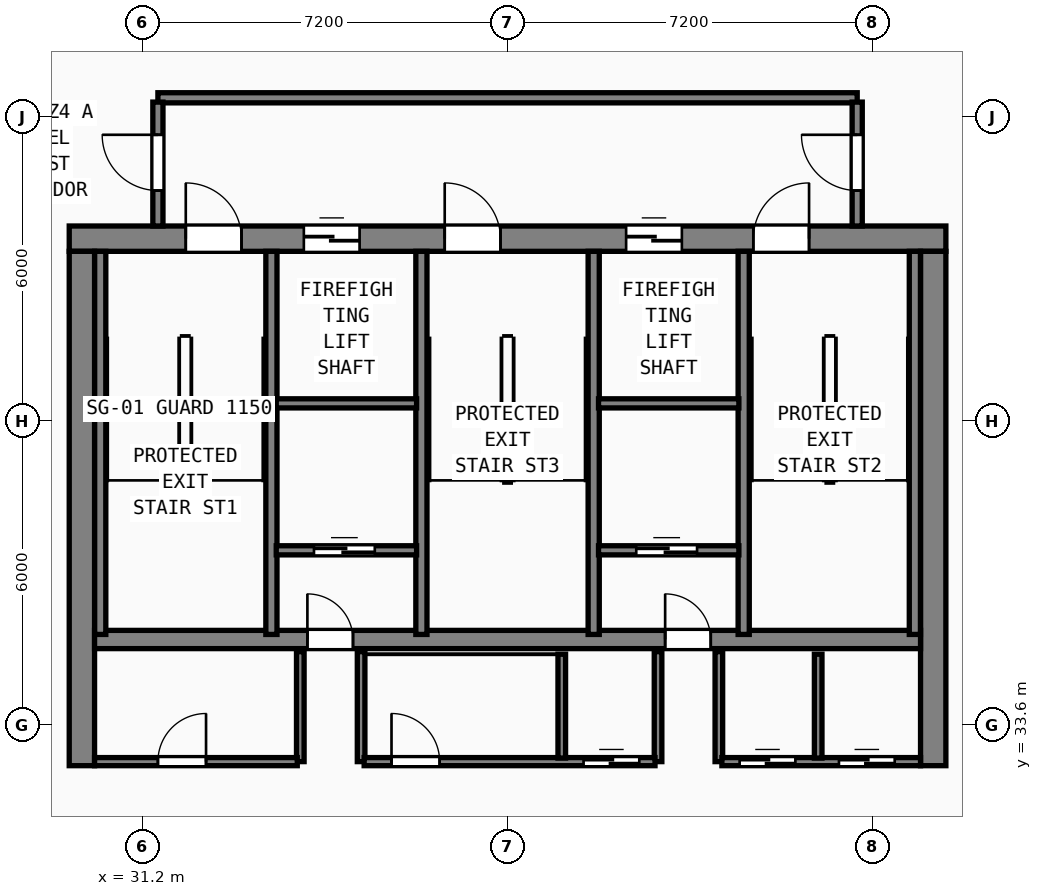
"""IFC4 building model, lengths in metres.
Left out: names, types, materials, properties, quantities, classifications, styles, units other than length and angle.
Written with IfcOpenShell. Run it as: python <this file> out.ifc"""

import sys

from ifc_helpers import new_model, si_unit, direction, frame, frame_2d, origin, place, context, subcontext, project, spatial, rectangle, extrude, element, fill, save


model = new_model("IFC4")
c1 = context("Model", 3, precision=1e-05, world=origin(), true_north=direction((0.0, 1.0)))
c2 = subcontext(c1, "Body", "Model", "MODEL_VIEW")
j1 = project(units=[si_unit("LENGTHUNIT", "METRE"), si_unit("PLANEANGLEUNIT", "RADIAN")], contexts=[c1])
p1 = place(None, origin())
s1 = spatial("IfcSite", under=j1, at=p1, CompositionType="ELEMENT")
p2 = place(p1, origin())
s2 = spatial("IfcBuilding", under=s1, at=p2, CompositionType="ELEMENT")
p3 = place(p2, frame((0.0, 0.0, 235.2)))
s3 = spatial("IfcBuildingStorey", under=s2, at=p3, CompositionType="ELEMENT", Elevation=235.2)
p4 = place(p3, frame((29.75, 43.2, 0.0), z_axis=(0.0, 0.0, 1.0), x_axis=(1.0, 0.0, 0.0)))
e1 = element("IfcWall", 1, at=p4, inside=s3, PredefinedType="SHEAR", context=c2, shape_type="SweptSolid", body=[
    extrude(rectangle(XDim=17.3, YDim=0.5, at=frame_2d((8.65, 0.0))), origin(), (0.0, 0.0, 1.0), 3.67),
])
p5 = place(p4, frame((2.3, 0.0, 0.0)))
e2 = element("IfcOpeningElement", 2, at=p5, cuts=e1, PredefinedType="OPENING", context=c2, shape_type="SweptSolid", body=[
    extrude(rectangle(XDim=1.1, YDim=2.15, at=frame_2d((0.55, 1.075))), frame((0.0, 0.26, 0.0), z_axis=(0.0, -1.0, 0.0), x_axis=(1.0, 0.0, 0.0)), (0.0, 0.0, 1.0), 0.52),
])
p6 = place(p4, frame((7.41, 0.0, 0.0)))
e3 = element("IfcOpeningElement", 3, at=p6, cuts=e1, PredefinedType="OPENING", context=c2, shape_type="SweptSolid", body=[
    extrude(rectangle(XDim=1.1, YDim=2.15, at=frame_2d((0.55, 1.075))), frame((0.0, 0.26, 0.0), z_axis=(0.0, -1.0, 0.0), x_axis=(1.0, 0.0, 0.0)), (0.0, 0.0, 1.0), 0.52),
])
p7 = place(p4, frame((13.5, 0.0, 0.0)))
e4 = element("IfcOpeningElement", 4, at=p7, cuts=e1, PredefinedType="OPENING", context=c2, shape_type="SweptSolid", body=[
    extrude(rectangle(XDim=1.1, YDim=2.15, at=frame_2d((0.55, 1.075))), frame((0.0, 0.26, 0.0), z_axis=(0.0, -1.0, 0.0), x_axis=(1.0, 0.0, 0.0)), (0.0, 0.0, 1.0), 0.52),
])
p8 = place(p4, frame((4.63, 0.0, 0.0)))
e5 = element("IfcOpeningElement", 5, at=p8, cuts=e1, PredefinedType="OPENING", context=c2, shape_type="SweptSolid", body=[
    extrude(rectangle(XDim=1.1, YDim=2.2, at=frame_2d((0.55, 1.1))), frame((0.0, 0.26, 0.0), z_axis=(0.0, -1.0, 0.0), x_axis=(1.0, 0.0, 0.0)), (0.0, 0.0, 1.0), 0.52),
])
p9 = place(p4, frame((10.99, 0.0, 0.0)))
e6 = element("IfcOpeningElement", 6, at=p9, cuts=e1, PredefinedType="OPENING", context=c2, shape_type="SweptSolid", body=[
    extrude(rectangle(XDim=1.1, YDim=2.2, at=frame_2d((0.55, 1.1))), frame((0.0, 0.26, 0.0), z_axis=(0.0, -1.0, 0.0), x_axis=(1.0, 0.0, 0.0)), (0.0, 0.0, 1.0), 0.52),
])
for number, where, z_axis, x_axis in (
    (7, (30.0, 32.8, 0.0), (0.0, 0.0, 1.0), (0.0, 1.0, 0.0)),
    (8, (46.8, 32.8, 0.0), (0.0, 0.0, 1.0), (0.0, 1.0, 0.0)),
):
    element("IfcWall", number, at=place(p3, frame(where, z_axis=z_axis, x_axis=x_axis)), inside=s3, PredefinedType="SHEAR", context=c2, shape_type="SweptSolid", body=[
        extrude(rectangle(XDim=10.15, YDim=0.5, at=frame_2d((5.075, 0.0))), origin(), (0.0, 0.0, 1.0), 3.67),
    ])
p10 = place(p3, frame((30.25, 35.29, 0.0), z_axis=(0.0, 0.0, 1.0), x_axis=(1.0, 0.0, 0.0)))
e9 = element("IfcWall", 9, at=p10, inside=s3, PredefinedType="SHEAR", context=c2, shape_type="SweptSolid", body=[
    extrude(rectangle(XDim=16.3, YDim=0.36, at=frame_2d((8.15, 0.0))), origin(), (0.0, 0.0, 1.0), 3.67),
])
p11 = place(p10, frame((5.1, 0.0, 0.0), z_axis=(0.0, 0.0, 1.0), x_axis=(-1.0, 0.0, 0.0)))
e10 = element("IfcOpeningElement", 10, at=p11, cuts=e9, PredefinedType="OPENING", context=c2, shape_type="SweptSolid", body=[
    extrude(rectangle(XDim=0.9, YDim=2.1, at=frame_2d((0.45, 1.05))), frame((0.0, 0.19, 0.0), z_axis=(0.0, -1.0, 0.0), x_axis=(1.0, 0.0, 0.0)), (0.0, 0.0, 1.0), 0.38),
])
p12 = place(p10, frame((12.16, 0.0, 0.0), z_axis=(0.0, 0.0, 1.0), x_axis=(-1.0, 0.0, 0.0)))
e11 = element("IfcOpeningElement", 11, at=p12, cuts=e9, PredefinedType="OPENING", context=c2, shape_type="SweptSolid", body=[
    extrude(rectangle(XDim=0.9, YDim=2.1, at=frame_2d((0.45, 1.05))), frame((0.0, 0.19, 0.0), z_axis=(0.0, -1.0, 0.0), x_axis=(1.0, 0.0, 0.0)), (0.0, 0.0, 1.0), 0.38),
])
for number, where, z_axis, x_axis in (
    (12, (30.362, 35.39, 0.0), (0.0, 0.0, 1.0), (0.0, 1.0, 0.0)),
    (13, (33.74, 35.39, 0.0), (0.0, 0.0, 1.0), (0.0, 1.0, 0.0)),
    (14, (36.7, 35.39, 0.0), (0.0, 0.0, 1.0), (0.0, 1.0, 0.0)),
    (15, (40.1, 35.39, 0.0), (0.0, 0.0, 1.0), (0.0, 1.0, 0.0)),
    (16, (43.06, 35.39, 0.0), (0.0, 0.0, 1.0), (0.0, 1.0, 0.0)),
    (17, (46.438, 35.39, 0.0), (0.0, 0.0, 1.0), (0.0, 1.0, 0.0)),
):
    element("IfcWall", number, at=place(p3, frame(where, z_axis=z_axis, x_axis=x_axis)), inside=s3, PredefinedType="SHEAR", context=c2, shape_type="SweptSolid", body=[
        extrude(rectangle(XDim=7.56, YDim=0.22, at=frame_2d((3.78, 0.0))), origin(), (0.0, 0.0, 1.0), 3.67),
    ])
p13 = place(p3, frame((31.5, 45.98, 0.0), z_axis=(0.0, 0.0, 1.0), x_axis=(1.0, 0.0, 0.0)))
e18 = element("IfcWall", 18, at=p13, inside=s3, PredefinedType="SOLIDWALL", context=c2, shape_type="SweptSolid", body=[
    extrude(rectangle(XDim=13.8, YDim=0.2, at=frame_2d((6.9, 0.0))), origin(), (0.0, 0.0, 1.0), 3.67),
])
p14 = place(p3, frame((31.5, 43.45, 0.0), z_axis=(0.0, 0.0, 1.0), x_axis=(0.0, 1.0, 0.0)))
e19 = element("IfcWall", 19, at=p14, inside=s3, PredefinedType="SOLIDWALL", context=c2, shape_type="SweptSolid", body=[
    extrude(rectangle(XDim=2.445, YDim=0.2, at=frame_2d((1.223, 0.0))), origin(), (0.0, 0.0, 1.0), 3.67),
])
p15 = place(p14, frame((1.8, 0.0, 0.0), z_axis=(0.0, 0.0, 1.0), x_axis=(-1.0, 0.0, 0.0)))
e20 = element("IfcOpeningElement", 20, at=p15, cuts=e19, PredefinedType="OPENING", context=c2, shape_type="SweptSolid", body=[
    extrude(rectangle(XDim=1.1, YDim=2.15, at=frame_2d((0.55, 1.075))), frame((0.0, 0.11, 0.0), z_axis=(0.0, -1.0, 0.0), x_axis=(1.0, 0.0, 0.0)), (0.0, 0.0, 1.0), 0.22),
])
p16 = place(p3, frame((45.3, 43.45, 0.0), z_axis=(0.0, 0.0, 1.0), x_axis=(0.0, 1.0, 0.0)))
e21 = element("IfcWall", 21, at=p16, inside=s3, PredefinedType="SOLIDWALL", context=c2, shape_type="SweptSolid", body=[
    extrude(rectangle(XDim=2.445, YDim=0.2, at=frame_2d((1.223, 0.0))), origin(), (0.0, 0.0, 1.0), 3.67),
])
p17 = place(p16, frame((0.7, 0.0, 0.0)))
e22 = element("IfcOpeningElement", 22, at=p17, cuts=e21, PredefinedType="OPENING", context=c2, shape_type="SweptSolid", body=[
    extrude(rectangle(XDim=1.1, YDim=2.15, at=frame_2d((0.55, 1.075))), frame((0.0, 0.11, 0.0), z_axis=(0.0, -1.0, 0.0), x_axis=(1.0, 0.0, 0.0)), (0.0, 0.0, 1.0), 0.22),
])
for number, where, z_axis, x_axis in (
    (23, (33.835, 39.95, 0.0), (0.0, 0.0, 1.0), (1.0, 0.0, 0.0)),
    (24, (40.195, 39.95, 0.0), (0.0, 0.0, 1.0), (1.0, 0.0, 0.0)),
):
    element("IfcWall", number, at=place(p3, frame(where, z_axis=z_axis, x_axis=x_axis)), inside=s3, PredefinedType="SOLIDWALL", context=c2, shape_type="SweptSolid", body=[
        extrude(rectangle(XDim=2.77, YDim=0.18, at=frame_2d((1.385, 0.0))), origin(), (0.0, 0.0, 1.0), 3.67),
    ])
p18 = place(p3, frame((33.835, 37.05, 0.0), z_axis=(0.0, 0.0, 1.0), x_axis=(1.0, 0.0, 0.0)))
e25 = element("IfcWall", 25, at=p18, inside=s3, PredefinedType="SOLIDWALL", context=c2, shape_type="SweptSolid", body=[
    extrude(rectangle(XDim=2.77, YDim=0.18, at=frame_2d((1.385, 0.0))), origin(), (0.0, 0.0, 1.0), 3.67),
])
p19 = place(p18, frame((1.945, 0.0, 0.0), z_axis=(0.0, 0.0, 1.0), x_axis=(-1.0, 0.0, 0.0)))
e26 = element("IfcOpeningElement", 26, at=p19, cuts=e25, PredefinedType="OPENING", context=c2, shape_type="SweptSolid", body=[
    extrude(rectangle(XDim=1.2, YDim=2.2, at=frame_2d((0.6, 1.1))), frame((0.0, 0.1, 0.0), z_axis=(0.0, -1.0, 0.0), x_axis=(1.0, 0.0, 0.0)), (0.0, 0.0, 1.0), 0.2),
])
for number, where, z_axis, x_axis in (
    (27, (34.31, 32.88, 0.0), (0.0, 0.0, 1.0), (0.0, 1.0, 0.0)),
    (28, (35.51, 32.88, 0.0), (0.0, 0.0, 1.0), (0.0, 1.0, 0.0)),
):
    element("IfcWall", number, at=place(p3, frame(where, z_axis=z_axis, x_axis=x_axis)), inside=s3, PredefinedType="SOLIDWALL", context=c2, shape_type="SweptSolid", body=[
        extrude(rectangle(XDim=2.17, YDim=0.15, at=frame_2d((1.085, 0.0))), origin(), (0.0, 0.0, 1.0), 3.67),
    ])
p20 = place(p3, frame((40.195, 37.05, 0.0), z_axis=(0.0, 0.0, 1.0), x_axis=(1.0, 0.0, 0.0)))
e29 = element("IfcWall", 29, at=p20, inside=s3, PredefinedType="SOLIDWALL", context=c2, shape_type="SweptSolid", body=[
    extrude(rectangle(XDim=2.77, YDim=0.18, at=frame_2d((1.385, 0.0))), origin(), (0.0, 0.0, 1.0), 3.67),
])
p21 = place(p20, frame((1.945, 0.0, 0.0), z_axis=(0.0, 0.0, 1.0), x_axis=(-1.0, 0.0, 0.0)))
e30 = element("IfcOpeningElement", 30, at=p21, cuts=e29, PredefinedType="OPENING", context=c2, shape_type="SweptSolid", body=[
    extrude(rectangle(XDim=1.2, YDim=2.2, at=frame_2d((0.6, 1.1))), frame((0.0, 0.1, 0.0), z_axis=(0.0, -1.0, 0.0), x_axis=(1.0, 0.0, 0.0)), (0.0, 0.0, 1.0), 0.2),
])
for number, where, z_axis, x_axis in (
    (31, (41.37, 32.88, 0.0), (0.0, 0.0, 1.0), (0.0, 1.0, 0.0)),
    (32, (42.57, 32.88, 0.0), (0.0, 0.0, 1.0), (0.0, 1.0, 0.0)),
):
    element("IfcWall", number, at=place(p3, frame(where, z_axis=z_axis, x_axis=x_axis)), inside=s3, PredefinedType="SOLIDWALL", context=c2, shape_type="SweptSolid", body=[
        extrude(rectangle(XDim=2.17, YDim=0.15, at=frame_2d((1.085, 0.0))), origin(), (0.0, 0.0, 1.0), 3.67),
    ])
p22 = place(p3, frame((30.25, 32.88, 0.0), z_axis=(0.0, 0.0, 1.0), x_axis=(1.0, 0.0, 0.0)))
e33 = element("IfcWall", 33, at=p22, inside=s3, PredefinedType="SOLIDWALL", context=c2, shape_type="SweptSolid", body=[
    extrude(rectangle(XDim=4.0, YDim=0.16, at=frame_2d((2.0, 0.0))), origin(), (0.0, 0.0, 1.0), 3.67),
])
p23 = place(p22, frame((2.2, 0.0, 0.0), z_axis=(0.0, 0.0, 1.0), x_axis=(-1.0, 0.0, 0.0)))
e34 = element("IfcOpeningElement", 34, at=p23, cuts=e33, PredefinedType="OPENING", context=c2, shape_type="SweptSolid", body=[
    extrude(rectangle(XDim=0.95, YDim=2.12, at=frame_2d((0.475, 1.06))), frame((0.0, 0.09, 0.0), z_axis=(0.0, -1.0, 0.0), x_axis=(1.0, 0.0, 0.0)), (0.0, 0.0, 1.0), 0.18),
])
p24 = place(p3, frame((35.57, 32.88, 0.0), z_axis=(0.0, 0.0, 1.0), x_axis=(1.0, 0.0, 0.0)))
e35 = element("IfcWall", 35, at=p24, inside=s3, PredefinedType="SOLIDWALL", context=c2, shape_type="SweptSolid", body=[
    extrude(rectangle(XDim=5.74, YDim=0.16, at=frame_2d((2.87, 0.0))), origin(), (0.0, 0.0, 1.0), 3.67),
])
p25 = place(p24, frame((1.49, 0.0, 0.0), z_axis=(0.0, 0.0, 1.0), x_axis=(-1.0, 0.0, 0.0)))
e36 = element("IfcOpeningElement", 36, at=p25, cuts=e35, PredefinedType="OPENING", context=c2, shape_type="SweptSolid", body=[
    extrude(rectangle(XDim=0.95, YDim=2.12, at=frame_2d((0.475, 1.06))), frame((0.0, 0.09, 0.0), z_axis=(0.0, -1.0, 0.0), x_axis=(1.0, 0.0, 0.0)), (0.0, 0.0, 1.0), 0.18),
])
p26 = place(p24, frame((5.43, 0.0, 0.0), z_axis=(0.0, 0.0, 1.0), x_axis=(-1.0, 0.0, 0.0)))
e37 = element("IfcOpeningElement", 37, at=p26, cuts=e35, PredefinedType="OPENING", context=c2, shape_type="SweptSolid", body=[
    extrude(rectangle(XDim=1.1, YDim=2.2, at=frame_2d((0.55, 1.1))), frame((0.0, 0.09, 0.0), z_axis=(0.0, -1.0, 0.0), x_axis=(1.0, 0.0, 0.0)), (0.0, 0.0, 1.0), 0.18),
])
p27 = place(p3, frame((42.63, 32.88, 0.0), z_axis=(0.0, 0.0, 1.0), x_axis=(1.0, 0.0, 0.0)))
e38 = element("IfcWall", 38, at=p27, inside=s3, PredefinedType="SOLIDWALL", context=c2, shape_type="SweptSolid", body=[
    extrude(rectangle(XDim=3.92, YDim=0.16, at=frame_2d((1.96, 0.0))), origin(), (0.0, 0.0, 1.0), 3.67),
])
p28 = place(p27, frame((1.45, 0.0, 0.0), z_axis=(0.0, 0.0, 1.0), x_axis=(-1.0, 0.0, 0.0)))
e39 = element("IfcOpeningElement", 39, at=p28, cuts=e38, PredefinedType="OPENING", context=c2, shape_type="SweptSolid", body=[
    extrude(rectangle(XDim=1.1, YDim=2.2, at=frame_2d((0.55, 1.1))), frame((0.0, 0.09, 0.0), z_axis=(0.0, -1.0, 0.0), x_axis=(1.0, 0.0, 0.0)), (0.0, 0.0, 1.0), 0.18),
])
p29 = place(p27, frame((3.41, 0.0, 0.0), z_axis=(0.0, 0.0, 1.0), x_axis=(-1.0, 0.0, 0.0)))
e40 = element("IfcOpeningElement", 40, at=p29, cuts=e38, PredefinedType="OPENING", context=c2, shape_type="SweptSolid", body=[
    extrude(rectangle(XDim=1.1, YDim=2.2, at=frame_2d((0.55, 1.1))), frame((0.0, 0.09, 0.0), z_axis=(0.0, -1.0, 0.0), x_axis=(1.0, 0.0, 0.0)), (0.0, 0.0, 1.0), 0.18),
])
for number, where, z_axis, x_axis in (
    (41, (39.47, 32.95, 0.0), (0.0, 0.0, 1.0), (0.0, 1.0, 0.0)),
    (42, (44.53, 32.95, 0.0), (0.0, 0.0, 1.0), (0.0, 1.0, 0.0)),
):
    element("IfcWall", number, at=place(p3, frame(where, z_axis=z_axis, x_axis=x_axis)), inside=s3, PredefinedType="SOLIDWALL", context=c2, shape_type="SweptSolid", body=[
        extrude(rectangle(XDim=2.05, YDim=0.15, at=frame_2d((1.025, 0.0))), origin(), (0.0, 0.0, 1.0), 3.67),
    ])
p30 = place(p5, origin())
e43 = element("IfcDoor", 43, at=p30, inside=s3, OperationType="SINGLE_SWING_LEFT", PredefinedType="DOOR", context=c2, shape_type="SweptSolid", body=[
    extrude(rectangle(XDim=1.1, YDim=2.15, at=frame_2d((0.55, 1.075))), frame((0.0, 0.185, 0.0), z_axis=(0.0, -1.0, 0.0), x_axis=(1.0, 0.0, 0.0)), (0.0, 0.0, 1.0), 0.05),
])
fill(e2, e43)
p31 = place(p6, origin())
e44 = element("IfcDoor", 44, at=p31, inside=s3, OperationType="SINGLE_SWING_LEFT", PredefinedType="DOOR", context=c2, shape_type="SweptSolid", body=[
    extrude(rectangle(XDim=1.1, YDim=2.15, at=frame_2d((0.55, 1.075))), frame((0.0, 0.185, 0.0), z_axis=(0.0, -1.0, 0.0), x_axis=(1.0, 0.0, 0.0)), (0.0, 0.0, 1.0), 0.05),
])
fill(e3, e44)
p32 = place(p7, origin())
e45 = element("IfcDoor", 45, at=p32, inside=s3, OperationType="SINGLE_SWING_RIGHT", PredefinedType="DOOR", context=c2, shape_type="SweptSolid", body=[
    extrude(rectangle(XDim=1.1, YDim=2.15, at=frame_2d((0.55, 1.075))), frame((0.0, 0.185, 0.0), z_axis=(0.0, -1.0, 0.0), x_axis=(1.0, 0.0, 0.0)), (0.0, 0.0, 1.0), 0.05),
])
fill(e4, e45)
p33 = place(p15, origin())
e46 = element("IfcDoor", 46, at=p33, inside=s3, OperationType="SINGLE_SWING_LEFT", PredefinedType="DOOR", context=c2, shape_type="SweptSolid", body=[
    extrude(rectangle(XDim=1.1, YDim=2.15, at=frame_2d((0.55, 1.075))), frame((0.0, 0.025, 0.0), z_axis=(0.0, -1.0, 0.0), x_axis=(1.0, 0.0, 0.0)), (0.0, 0.0, 1.0), 0.05),
])
fill(e20, e46)
p34 = place(p17, origin())
e47 = element("IfcDoor", 47, at=p34, inside=s3, OperationType="SINGLE_SWING_RIGHT", PredefinedType="DOOR", context=c2, shape_type="SweptSolid", body=[
    extrude(rectangle(XDim=1.1, YDim=2.15, at=frame_2d((0.55, 1.075))), frame((0.0, 0.025, 0.0), z_axis=(0.0, -1.0, 0.0), x_axis=(1.0, 0.0, 0.0)), (0.0, 0.0, 1.0), 0.05),
])
fill(e22, e47)
p35 = place(p8, origin())
e48 = element("IfcDoor", 48, at=p35, inside=s3, OperationType="SLIDING_TO_LEFT", PredefinedType="DOOR", context=c2, shape_type="SweptSolid", body=[
    extrude(rectangle(XDim=1.1, YDim=2.2, at=frame_2d((0.55, 1.1))), frame((0.0, 0.185, 0.0), z_axis=(0.0, -1.0, 0.0), x_axis=(1.0, 0.0, 0.0)), (0.0, 0.0, 1.0), 0.05),
])
fill(e5, e48)
p36 = place(p9, origin())
e49 = element("IfcDoor", 49, at=p36, inside=s3, OperationType="SLIDING_TO_LEFT", PredefinedType="DOOR", context=c2, shape_type="SweptSolid", body=[
    extrude(rectangle(XDim=1.1, YDim=2.2, at=frame_2d((0.55, 1.1))), frame((0.0, 0.185, 0.0), z_axis=(0.0, -1.0, 0.0), x_axis=(1.0, 0.0, 0.0)), (0.0, 0.0, 1.0), 0.05),
])
fill(e6, e49)
p37 = place(p19, origin())
e50 = element("IfcDoor", 50, at=p37, inside=s3, OperationType="SLIDING_TO_RIGHT", PredefinedType="DOOR", context=c2, shape_type="SweptSolid", body=[
    extrude(rectangle(XDim=1.2, YDim=2.2, at=frame_2d((0.6, 1.1))), frame((0.0, 0.025, 0.0), z_axis=(0.0, -1.0, 0.0), x_axis=(1.0, 0.0, 0.0)), (0.0, 0.0, 1.0), 0.05),
])
fill(e26, e50)
p38 = place(p11, origin())
e51 = element("IfcDoor", 51, at=p38, inside=s3, OperationType="SINGLE_SWING_RIGHT", PredefinedType="DOOR", context=c2, shape_type="SweptSolid", body=[
    extrude(rectangle(XDim=0.9, YDim=2.1, at=frame_2d((0.45, 1.05))), frame((0.0, 0.025, 0.0), z_axis=(0.0, -1.0, 0.0), x_axis=(1.0, 0.0, 0.0)), (0.0, 0.0, 1.0), 0.05),
])
fill(e10, e51)
p39 = place(p21, origin())
e52 = element("IfcDoor", 52, at=p39, inside=s3, OperationType="SLIDING_TO_RIGHT", PredefinedType="DOOR", context=c2, shape_type="SweptSolid", body=[
    extrude(rectangle(XDim=1.2, YDim=2.2, at=frame_2d((0.6, 1.1))), frame((0.0, 0.025, 0.0), z_axis=(0.0, -1.0, 0.0), x_axis=(1.0, 0.0, 0.0)), (0.0, 0.0, 1.0), 0.05),
])
fill(e30, e52)
p40 = place(p12, origin())
e53 = element("IfcDoor", 53, at=p40, inside=s3, OperationType="SINGLE_SWING_RIGHT", PredefinedType="DOOR", context=c2, shape_type="SweptSolid", body=[
    extrude(rectangle(XDim=0.9, YDim=2.1, at=frame_2d((0.45, 1.05))), frame((0.0, 0.025, 0.0), z_axis=(0.0, -1.0, 0.0), x_axis=(1.0, 0.0, 0.0)), (0.0, 0.0, 1.0), 0.05),
])
fill(e11, e53)
p41 = place(p23, origin())
e54 = element("IfcDoor", 54, at=p41, inside=s3, OperationType="SINGLE_SWING_LEFT", PredefinedType="DOOR", context=c2, shape_type="SweptSolid", body=[
    extrude(rectangle(XDim=0.95, YDim=2.12, at=frame_2d((0.475, 1.06))), frame((0.0, 0.025, 0.0), z_axis=(0.0, -1.0, 0.0), x_axis=(1.0, 0.0, 0.0)), (0.0, 0.0, 1.0), 0.05),
])
fill(e34, e54)
p42 = place(p25, origin())
e55 = element("IfcDoor", 55, at=p42, inside=s3, OperationType="SINGLE_SWING_RIGHT", PredefinedType="DOOR", context=c2, shape_type="SweptSolid", body=[
    extrude(rectangle(XDim=0.95, YDim=2.12, at=frame_2d((0.475, 1.06))), frame((0.0, 0.025, 0.0), z_axis=(0.0, -1.0, 0.0), x_axis=(1.0, 0.0, 0.0)), (0.0, 0.0, 1.0), 0.05),
])
fill(e36, e55)
p43 = place(p26, origin())
e56 = element("IfcDoor", 56, at=p43, inside=s3, OperationType="SLIDING_TO_RIGHT", PredefinedType="DOOR", context=c2, shape_type="SweptSolid", body=[
    extrude(rectangle(XDim=1.1, YDim=2.2, at=frame_2d((0.55, 1.1))), frame((0.0, 0.025, 0.0), z_axis=(0.0, -1.0, 0.0), x_axis=(1.0, 0.0, 0.0)), (0.0, 0.0, 1.0), 0.05),
])
fill(e37, e56)
p44 = place(p28, origin())
e57 = element("IfcDoor", 57, at=p44, inside=s3, OperationType="SLIDING_TO_RIGHT", PredefinedType="DOOR", context=c2, shape_type="SweptSolid", body=[
    extrude(rectangle(XDim=1.1, YDim=2.2, at=frame_2d((0.55, 1.1))), frame((0.0, 0.025, 0.0), z_axis=(0.0, -1.0, 0.0), x_axis=(1.0, 0.0, 0.0)), (0.0, 0.0, 1.0), 0.05),
])
fill(e39, e57)
p45 = place(p29, origin())
e58 = element("IfcDoor", 58, at=p45, inside=s3, OperationType="SLIDING_TO_RIGHT", PredefinedType="DOOR", context=c2, shape_type="SweptSolid", body=[
    extrude(rectangle(XDim=1.1, YDim=2.2, at=frame_2d((0.55, 1.1))), frame((0.0, 0.025, 0.0), z_axis=(0.0, -1.0, 0.0), x_axis=(1.0, 0.0, 0.0)), (0.0, 0.0, 1.0), 0.05),
])
fill(e40, e58)
save(model, sys.argv[1])
